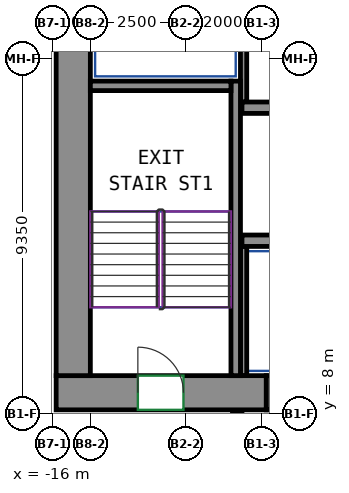
"""IFC4 building model, lengths in metres.
Left out: names, types, materials, properties, quantities, classifications, styles, units other than length and angle.
Written with IfcOpenShell. Run it as: python <this file> out.ifc"""

import sys

from ifc_helpers import new_model, si_unit, direction, frame, frame_2d, origin, place, context, subcontext, project, spatial, rectangle, extrude, source, transform, mapped, element, fill, save


model = new_model("IFC4")
c1 = context("Model", 3, precision=1e-05, world=origin(), true_north=direction((0.0, 1.0)))
c2 = subcontext(c1, "Body", "Model", "MODEL_VIEW")
j1 = project(units=[si_unit("LENGTHUNIT", "METRE"), si_unit("PLANEANGLEUNIT", "RADIAN")], contexts=[c1])
p1 = place(None, origin())
s1 = spatial("IfcSite", under=j1, at=p1, CompositionType="ELEMENT")
p2 = place(p1, origin())
s2 = spatial("IfcBuilding", under=s1, at=p2, CompositionType="ELEMENT")
p3 = place(p2, frame((0.0, 0.0, 168.5)))
s3 = spatial("IfcBuildingStorey", under=s2, at=p3, CompositionType="ELEMENT", Elevation=168.5)
m1 = source(origin(), c2, "Body", "SweptSolid", [
    extrude(rectangle(XDim=5.53, YDim=0.9, at=frame_2d((2.765, 0.0))), origin(), (0.0, 0.0, 1.0), 3.12),
])
p4 = place(p3, frame((-15.9, 8.55, 0.0), z_axis=(0.0, 0.0, 1.0), x_axis=(1.0, 0.0, 0.0)))
e1 = element("IfcWall", 1, at=p4, inside=s3, PredefinedType="SHEAR", context=c2, shape_type="MappedRepresentation", body=[
    mapped(m1, transform((0.0, 0.0, 0.0))),
])
p5 = place(p4, frame((2.15, 0.0, 0.0)))
e2 = element("IfcOpeningElement", 2, at=p5, cuts=e1, PredefinedType="OPENING", context=c2, shape_type="SweptSolid", body=[
    extrude(rectangle(XDim=1.2, YDim=2.1, at=frame_2d((0.6, 1.05))), frame((0.0, 0.46, 0.0), z_axis=(0.0, -1.0, 0.0), x_axis=(1.0, 0.0, 0.0)), (0.0, 0.0, 1.0), 0.92),
])
m2 = source(origin(), c2, "Body", "SweptSolid", [
    extrude(rectangle(XDim=12.0, YDim=0.9, at=frame_2d((6.0, 0.0))), origin(), (0.0, 0.0, 1.0), 3.12),
])
p6 = place(p3, frame((-15.45, 9.0, 0.0), z_axis=(0.0, 0.0, 1.0), x_axis=(0.0, 1.0, 0.0)))
e3 = element("IfcWall", 3, at=p6, inside=s3, PredefinedType="SHEAR", context=c2, shape_type="MappedRepresentation", body=[
    mapped(m2, transform((0.0, 0.0, 0.0))),
])
m3 = source(origin(), c2, "Body", "SweptSolid", [
    extrude(rectangle(XDim=7.75, YDim=0.25, at=frame_2d((3.875, 0.0))), origin(), (0.0, 0.0, 1.0), 3.12),
])
p7 = place(p3, frame((-11.175, 9.0, 0.0), z_axis=(0.0, 0.0, 1.0), x_axis=(0.0, 1.0, 0.0)))
e4 = element("IfcWall", 4, at=p7, inside=s3, PredefinedType="SHEAR", context=c2, shape_type="MappedRepresentation", body=[
    mapped(m3, transform((0.0, 0.0, 0.0))),
])
m4 = source(origin(), c2, "Body", "SweptSolid", [
    extrude(rectangle(XDim=3.7, YDim=0.25, at=frame_2d((1.85, 0.0))), origin(), (0.0, 0.0, 1.0), 3.12),
])
p8 = place(p3, frame((-15.0, 16.625, 0.0), z_axis=(0.0, 0.0, 1.0), x_axis=(1.0, 0.0, 0.0)))
e5 = element("IfcWall", 5, at=p8, inside=s3, PredefinedType="SHEAR", context=c2, shape_type="MappedRepresentation", body=[
    mapped(m4, transform((0.0, 0.0, 0.0))),
])
m5 = source(origin(), c2, "Body", "SweptSolid", [
    extrude(rectangle(XDim=6.0, YDim=0.3, at=frame_2d((3.0, 0.0))), origin(), (0.0, 0.0, 1.0), 3.12),
])
p9 = place(p3, frame((-11.01, 12.55, 0.0), z_axis=(0.0, 0.0, 1.0), x_axis=(1.0, 0.0, 0.0)))
e6 = element("IfcWall", 6, at=p9, inside=s3, PredefinedType="SHEAR", context=c2, shape_type="MappedRepresentation", body=[
    mapped(m5, transform((0.0, 0.0, 0.0))),
])
m6 = source(origin(), c2, "Body", "SweptSolid", [
    extrude(rectangle(XDim=14.04, YDim=0.3, at=frame_2d((7.02, 0.0))), origin(), (0.0, 0.0, 1.0), 3.12),
])
p10 = place(p3, frame((-11.01, 16.05, 0.0), z_axis=(0.0, 0.0, 1.0), x_axis=(1.0, 0.0, 0.0)))
e7 = element("IfcWall", 7, at=p10, inside=s3, PredefinedType="SHEAR", context=c2, shape_type="MappedRepresentation", body=[
    mapped(m6, transform((0.0, 0.0, 0.0))),
])
m7 = source(origin(), c2, "Body", "SweptSolid", [
    extrude(rectangle(XDim=4.8, YDim=0.165, at=frame_2d((2.4, 0.0))), origin(), (0.0, 0.0, 1.0), 3.12),
])
p11 = place(p3, frame((-10.968, 16.2, 0.0), z_axis=(0.0, 0.0, 1.0), x_axis=(0.0, 1.0, 0.0)))
e8 = element("IfcWall", 8, at=p11, inside=s3, PredefinedType="PARTITIONING", context=c2, shape_type="MappedRepresentation", body=[
    mapped(m7, transform((0.0, 0.0, 0.0))),
])
m8 = source(origin(), c2, "Body", "SweptSolid", [
    extrude(rectangle(XDim=3.4, YDim=0.165, at=frame_2d((1.7, 0.0))), origin(), (0.0, 0.0, 1.0), 3.12),
])
p12 = place(p3, frame((-10.968, 9.0, 0.0), z_axis=(0.0, 0.0, 1.0), x_axis=(0.0, 1.0, 0.0)))
e9 = element("IfcWall", 9, at=p12, inside=s3, PredefinedType="PARTITIONING", context=c2, shape_type="MappedRepresentation", body=[
    mapped(m8, transform((0.0, 0.0, 0.0))),
])
m9 = source(origin(), c2, "Body", "SweptSolid", [
    extrude(rectangle(XDim=1.4, YDim=0.9, at=frame_2d((0.7, 0.0))), origin(), (0.0, 0.0, 1.0), 2.7),
])
p13 = place(p3, frame((-10.37, 8.55, 0.0), z_axis=(0.0, 0.0, 1.0), x_axis=(1.0, 0.0, 0.0)))
e10 = element("IfcWall", 10, at=p13, inside=s3, PredefinedType="PARTITIONING", context=c2, shape_type="MappedRepresentation", body=[
    mapped(m9, transform((0.0, 0.0, 0.0))),
])
p14 = place(p13, frame((0.25, 0.0, 0.0)))
e11 = element("IfcOpeningElement", 11, at=p14, cuts=e10, PredefinedType="OPENING", context=c2, shape_type="SweptSolid", body=[
    extrude(rectangle(XDim=0.9, YDim=2.1, at=frame_2d((0.45, 1.05))), frame((0.0, 0.46, 0.0), z_axis=(0.0, -1.0, 0.0), x_axis=(1.0, 0.0, 0.0)), (0.0, 0.0, 1.0), 0.92),
])
p15 = place(p5, origin())
e12 = element("IfcDoor", 12, at=p15, inside=s3, OperationType="DOUBLE_DOOR_SINGLE_SWING", PredefinedType="DOOR", context=c2, shape_type="SweptSolid", body=[
    extrude(rectangle(XDim=1.2, YDim=2.1, at=frame_2d((0.6, 1.05))), frame((0.0, 0.355, 0.0), z_axis=(0.0, -1.0, 0.0), x_axis=(1.0, 0.0, 0.0)), (0.0, 0.0, 1.0), 0.05),
])
fill(e2, e12)
save(model, sys.argv[1])
